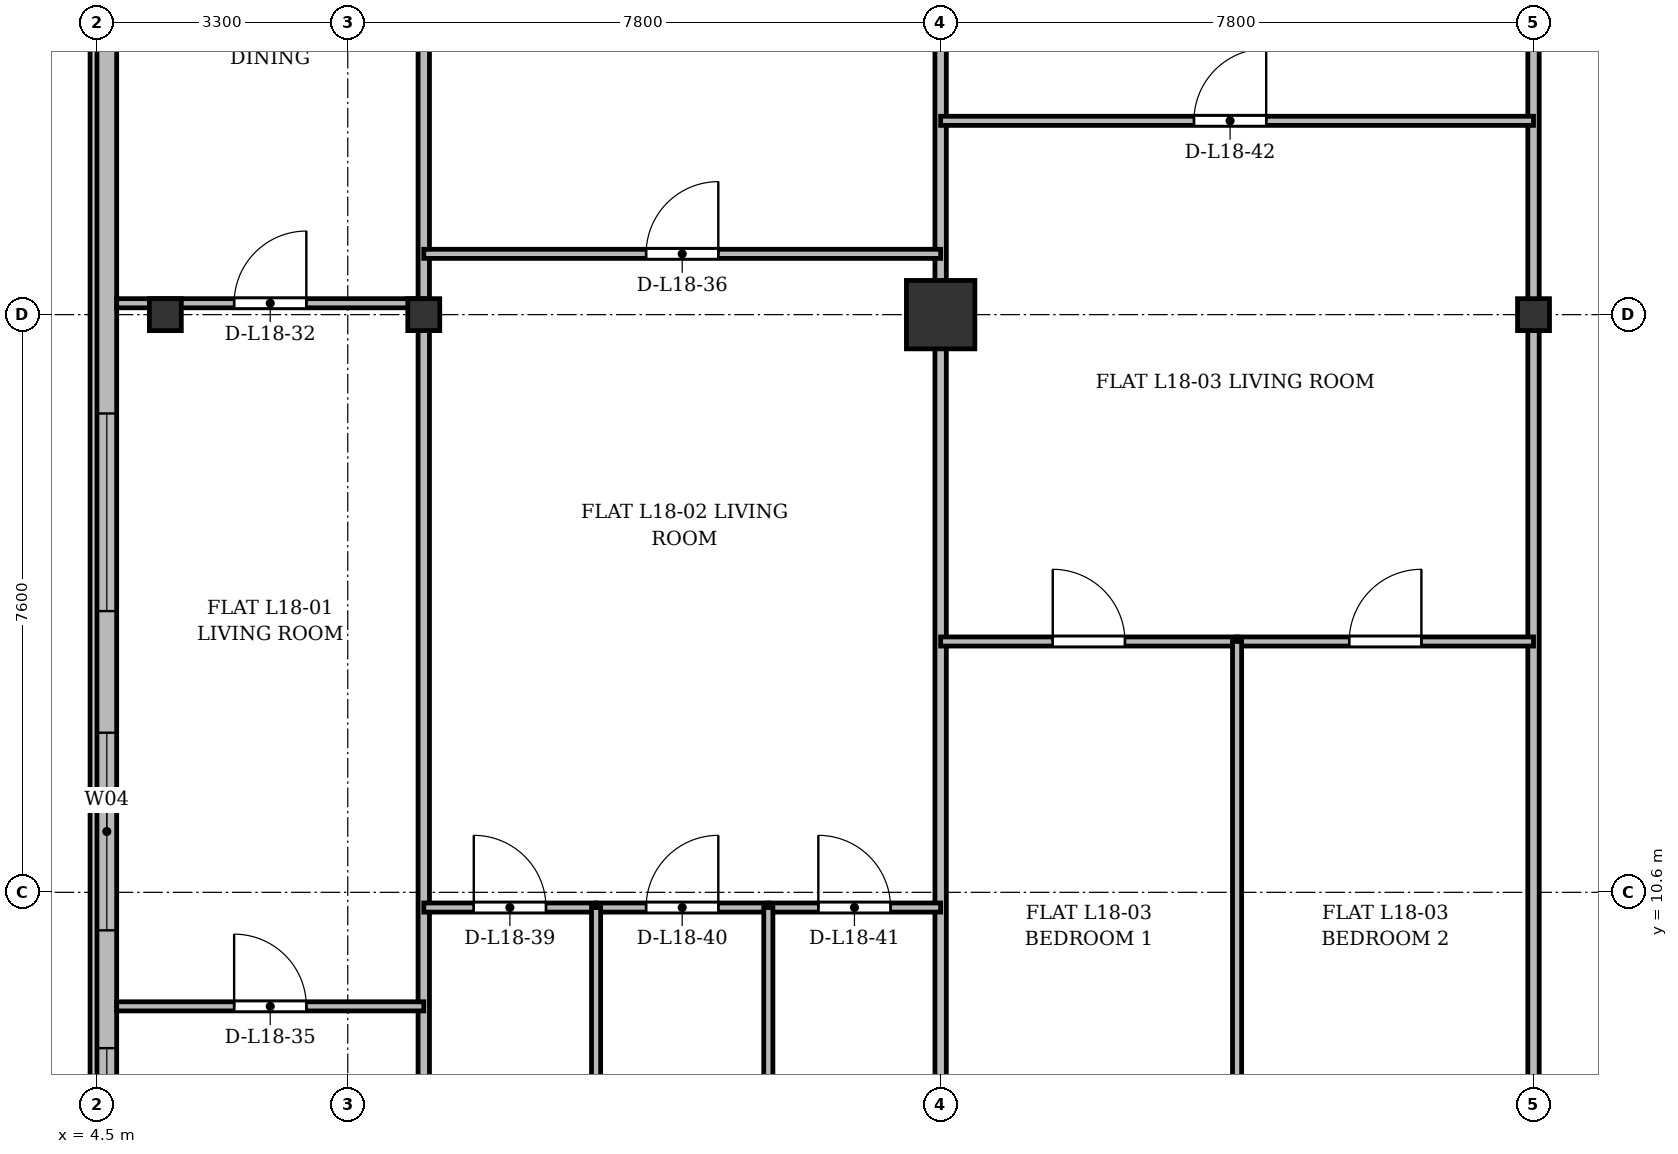
"""IFC4 building model, lengths in metres.
Left out: names, types, materials, properties, quantities, classifications, styles, units other than length and angle.
Written with IfcOpenShell. Run it as: python <this file> out.ifc"""

import sys

from ifc_helpers import new_model, si_unit, direction, frame, frame_2d, origin, origin_2d, place, context, subcontext, project, spatial, rectangle, i_section, extrude, source, transform, mapped, element, fill, save


model = new_model("IFC4")
c1 = context("Model", 3, precision=1e-05, world=origin(), true_north=direction((0.0, 1.0)))
c2 = subcontext(c1, "Body", "Model", "MODEL_VIEW")
j1 = project(units=[si_unit("LENGTHUNIT", "METRE"), si_unit("PLANEANGLEUNIT", "RADIAN")], contexts=[c1])
p1 = place(None, origin())
s1 = spatial("IfcSite", under=j1, at=p1, CompositionType="ELEMENT")
p2 = place(p1, origin())
s2 = spatial("IfcBuilding", under=s1, at=p2, CompositionType="ELEMENT")
p3 = place(p2, frame((0.0, 0.0, 70.3)))
s3 = spatial("IfcBuildingStorey", under=s2, at=p3, CompositionType="ELEMENT", Elevation=70.3)
m1 = source(origin(), c2, "Body", "SweptSolid", [
    extrude(i_section(OverallWidth=0.42, OverallDepth=0.42, WebThickness=0.026, FlangeThickness=0.04, at=origin_2d()), origin(), (0.0, 0.0, 1.0), 3.6),
])
for number, where, z_axis, x_axis in (
    (1, (5.4, 18.2, 0.0), (0.0, 0.0, 1.0), (1.0, 0.0, 0.0)),
    (2, (8.8, 18.2, 0.0), (0.0, 0.0, 1.0), (1.0, 0.0, 0.0)),
):
    element("IfcColumn", number, at=place(p3, frame(where, z_axis=z_axis, x_axis=x_axis)), inside=s3, PredefinedType="COLUMN", context=c2, shape_type="MappedRepresentation", body=[
        mapped(m1, transform((0.0, 0.0, 0.0), x_axis=(1.0, 0.0, 0.0), y_axis=(0.0, 1.0, 0.0), z_axis=(0.0, 0.0, 1.0), scale=1.0)),
    ])
m2 = source(origin(), c2, "Body", "SweptSolid", [
    extrude(rectangle(XDim=0.9, YDim=0.9, at=origin_2d()), origin(), (0.0, 0.0, 1.0), 3.6),
])
p4 = place(p3, frame((15.6, 18.2, 0.0), z_axis=(0.0, 0.0, 1.0), x_axis=(1.0, 0.0, 0.0)))
e3 = element("IfcColumn", 3, at=p4, inside=s3, PredefinedType="COLUMN", context=c2, shape_type="MappedRepresentation", body=[
    mapped(m2, transform((0.0, 0.0, 0.0), x_axis=(1.0, 0.0, 0.0), y_axis=(0.0, 1.0, 0.0), z_axis=(0.0, 0.0, 1.0), scale=1.0)),
])
p5 = place(p3, frame((23.4, 18.2, 0.0), z_axis=(0.0, 0.0, 1.0), x_axis=(1.0, 0.0, 0.0)))
e4 = element("IfcColumn", 4, at=p5, inside=s3, PredefinedType="COLUMN", context=c2, shape_type="MappedRepresentation", body=[
    mapped(m1, transform((0.0, 0.0, 0.0), x_axis=(1.0, 0.0, 0.0), y_axis=(0.0, 1.0, 0.0), z_axis=(0.0, 0.0, 1.0), scale=1.0)),
])
p6 = place(p3, frame((4.63, 5.9, 0.0), z_axis=(0.0, 0.0, 1.0), x_axis=(0.0, 1.0, 0.0)))
e5 = element("IfcWall", 5, at=p6, inside=s3, PredefinedType="SOLIDWALL", context=c2, shape_type="SweptSolid", body=[
    extrude(rectangle(XDim=39.6, YDim=0.26, at=frame_2d((19.8, 0.0))), origin(), (0.0, 0.0, 1.0), 3.22),
])
p7 = place(p6, frame((1.45, 0.0, 0.92)))
e6 = element("IfcOpeningElement", 6, at=p7, cuts=e5, PredefinedType="OPENING", context=c2, shape_type="SweptSolid", body=[
    extrude(rectangle(XDim=1.2, YDim=1.65, at=frame_2d((0.6, 0.825))), frame((0.0, 0.14, 0.0), z_axis=(0.0, -1.0, 0.0), x_axis=(1.0, 0.0, 0.0)), (0.0, 0.0, 1.0), 0.28),
])
p8 = place(p6, frame((4.2, 0.0, 0.92)))
e7 = element("IfcOpeningElement", 7, at=p8, cuts=e5, PredefinedType="OPENING", context=c2, shape_type="SweptSolid", body=[
    extrude(rectangle(XDim=2.6, YDim=1.9, at=frame_2d((1.3, 0.95))), frame((0.0, 0.14, 0.0), z_axis=(0.0, -1.0, 0.0), x_axis=(1.0, 0.0, 0.0)), (0.0, 0.0, 1.0), 0.28),
])
p9 = place(p6, frame((8.4, 0.0, 0.92)))
e8 = element("IfcOpeningElement", 8, at=p9, cuts=e5, PredefinedType="OPENING", context=c2, shape_type="SweptSolid", body=[
    extrude(rectangle(XDim=2.6, YDim=1.9, at=frame_2d((1.3, 0.95))), frame((0.0, 0.14, 0.0), z_axis=(0.0, -1.0, 0.0), x_axis=(1.0, 0.0, 0.0)), (0.0, 0.0, 1.0), 0.28),
])
p10 = place(p6, frame((33.9, 0.0, 0.92)))
e9 = element("IfcOpeningElement", 9, at=p10, cuts=e5, PredefinedType="OPENING", context=c2, shape_type="SweptSolid", body=[
    extrude(rectangle(XDim=1.2, YDim=1.65, at=frame_2d((0.6, 0.825))), frame((0.0, 0.14, 0.0), z_axis=(0.0, -1.0, 0.0), x_axis=(1.0, 0.0, 0.0)), (0.0, 0.0, 1.0), 0.28),
])
p11 = place(p6, frame((37.25, 0.0, 0.92)))
e10 = element("IfcOpeningElement", 10, at=p11, cuts=e5, PredefinedType="OPENING", context=c2, shape_type="SweptSolid", body=[
    extrude(rectangle(XDim=1.2, YDim=1.65, at=frame_2d((0.6, 0.825))), frame((0.0, 0.14, 0.0), z_axis=(0.0, -1.0, 0.0), x_axis=(1.0, 0.0, 0.0)), (0.0, 0.0, 1.0), 0.28),
])
for number, where, z_axis, x_axis in (
    (11, (8.8, 3.145, 0.0), (0.0, 0.0, 1.0), (0.0, 1.0, 0.0)),
    (12, (15.6, 3.145, 0.0), (0.0, 0.0, 1.0), (0.0, 1.0, 0.0)),
):
    element("IfcWall", number, at=place(p3, frame(where, z_axis=z_axis, x_axis=x_axis)), inside=s3, PredefinedType="PARTITIONING", context=c2, shape_type="SweptSolid", body=[
        extrude(rectangle(XDim=24.455, YDim=0.15, at=frame_2d((12.228, 0.0))), origin(), (0.0, 0.0, 1.0), 2.632),
    ])
p12 = place(p3, frame((23.4, 6.41, 0.0), z_axis=(0.0, 0.0, 1.0), x_axis=(0.0, 1.0, 0.0)))
e13 = element("IfcWall", 13, at=p12, inside=s3, PredefinedType="PARTITIONING", context=c2, shape_type="SweptSolid", body=[
    extrude(rectangle(XDim=21.19, YDim=0.15, at=frame_2d((10.595, 0.0))), origin(), (0.0, 0.0, 1.0), 2.632),
])
p13 = place(p3, frame((4.76, 18.35, 0.0), z_axis=(0.0, 0.0, 1.0), x_axis=(1.0, 0.0, 0.0)))
e14 = element("IfcWall", 14, at=p13, inside=s3, PredefinedType="PARTITIONING", context=c2, shape_type="SweptSolid", body=[
    extrude(rectangle(XDim=4.04, YDim=0.12, at=frame_2d((2.02, 0.0))), origin(), (0.0, 0.0, 1.0), 2.57),
])
p14 = place(p13, frame((1.545, 0.0, 0.0)))
e15 = element("IfcOpeningElement", 15, at=p14, cuts=e14, PredefinedType="OPENING", context=c2, shape_type="SweptSolid", body=[
    extrude(rectangle(XDim=0.95, YDim=2.15, at=frame_2d((0.475, 1.075))), frame((0.0, 0.07, 0.0), z_axis=(0.0, -1.0, 0.0), x_axis=(1.0, 0.0, 0.0)), (0.0, 0.0, 1.0), 0.14),
])
p15 = place(p3, frame((4.76, 9.1, 0.0), z_axis=(0.0, 0.0, 1.0), x_axis=(1.0, 0.0, 0.0)))
e16 = element("IfcWall", 16, at=p15, inside=s3, PredefinedType="PARTITIONING", context=c2, shape_type="SweptSolid", body=[
    extrude(rectangle(XDim=4.04, YDim=0.12, at=frame_2d((2.02, 0.0))), origin(), (0.0, 0.0, 1.0), 2.632),
])
p16 = place(p15, frame((1.545, 0.0, 0.0)))
e17 = element("IfcOpeningElement", 17, at=p16, cuts=e16, PredefinedType="OPENING", context=c2, shape_type="SweptSolid", body=[
    extrude(rectangle(XDim=0.95, YDim=2.15, at=frame_2d((0.475, 1.075))), frame((0.0, 0.07, 0.0), z_axis=(0.0, -1.0, 0.0), x_axis=(1.0, 0.0, 0.0)), (0.0, 0.0, 1.0), 0.14),
])
p17 = place(p3, frame((8.8, 19.0, 0.0), z_axis=(0.0, 0.0, 1.0), x_axis=(1.0, 0.0, 0.0)))
e18 = element("IfcWall", 18, at=p17, inside=s3, PredefinedType="PARTITIONING", context=c2, shape_type="SweptSolid", body=[
    extrude(rectangle(XDim=6.8, YDim=0.12, at=frame_2d((3.4, 0.0))), origin(), (0.0, 0.0, 1.0), 2.632),
])
p18 = place(p17, frame((2.925, 0.0, 0.0)))
e19 = element("IfcOpeningElement", 19, at=p18, cuts=e18, PredefinedType="OPENING", context=c2, shape_type="SweptSolid", body=[
    extrude(rectangle(XDim=0.95, YDim=2.15, at=frame_2d((0.475, 1.075))), frame((0.0, 0.07, 0.0), z_axis=(0.0, -1.0, 0.0), x_axis=(1.0, 0.0, 0.0)), (0.0, 0.0, 1.0), 0.14),
])
p19 = place(p3, frame((8.8, 10.4, 0.0), z_axis=(0.0, 0.0, 1.0), x_axis=(1.0, 0.0, 0.0)))
e20 = element("IfcWall", 20, at=p19, inside=s3, PredefinedType="PARTITIONING", context=c2, shape_type="SweptSolid", body=[
    extrude(rectangle(XDim=2.267, YDim=0.12, at=frame_2d((1.133, 0.0))), origin(), (0.0, 0.0, 1.0), 2.632),
])
p20 = place(p19, frame((0.658, 0.0, 0.0)))
e21 = element("IfcOpeningElement", 21, at=p20, cuts=e20, PredefinedType="OPENING", context=c2, shape_type="SweptSolid", body=[
    extrude(rectangle(XDim=0.95, YDim=2.15, at=frame_2d((0.475, 1.075))), frame((0.0, 0.07, 0.0), z_axis=(0.0, -1.0, 0.0), x_axis=(1.0, 0.0, 0.0)), (0.0, 0.0, 1.0), 0.14),
])
p21 = place(p3, frame((11.067, 10.4, 0.0), z_axis=(0.0, 0.0, 1.0), x_axis=(1.0, 0.0, 0.0)))
e22 = element("IfcWall", 22, at=p21, inside=s3, PredefinedType="PARTITIONING", context=c2, shape_type="SweptSolid", body=[
    extrude(rectangle(XDim=2.266, YDim=0.12, at=frame_2d((1.133, 0.0))), origin(), (0.0, 0.0, 1.0), 3.22),
])
p22 = place(p21, frame((0.658, 0.0, 0.0)))
e23 = element("IfcOpeningElement", 23, at=p22, cuts=e22, PredefinedType="OPENING", context=c2, shape_type="SweptSolid", body=[
    extrude(rectangle(XDim=0.95, YDim=2.15, at=frame_2d((0.475, 1.075))), frame((0.0, 0.07, 0.0), z_axis=(0.0, -1.0, 0.0), x_axis=(1.0, 0.0, 0.0)), (0.0, 0.0, 1.0), 0.14),
])
p23 = place(p3, frame((11.067, 3.145, 0.0), z_axis=(0.0, 0.0, 1.0), x_axis=(0.0, 1.0, 0.0)))
e24 = element("IfcWall", 24, at=p23, inside=s3, PredefinedType="PARTITIONING", context=c2, shape_type="SweptSolid", body=[
    extrude(rectangle(XDim=7.255, YDim=0.12, at=frame_2d((3.627, 0.0))), origin(), (0.0, 0.0, 1.0), 2.57),
])
p24 = place(p3, frame((13.333, 10.4, 0.0), z_axis=(0.0, 0.0, 1.0), x_axis=(1.0, 0.0, 0.0)))
e25 = element("IfcWall", 25, at=p24, inside=s3, PredefinedType="PARTITIONING", context=c2, shape_type="SweptSolid", body=[
    extrude(rectangle(XDim=2.267, YDim=0.12, at=frame_2d((1.134, 0.0))), origin(), (0.0, 0.0, 1.0), 2.632),
])
p25 = place(p24, frame((0.658, 0.0, 0.0)))
e26 = element("IfcOpeningElement", 26, at=p25, cuts=e25, PredefinedType="OPENING", context=c2, shape_type="SweptSolid", body=[
    extrude(rectangle(XDim=0.95, YDim=2.15, at=frame_2d((0.475, 1.075))), frame((0.0, 0.07, 0.0), z_axis=(0.0, -1.0, 0.0), x_axis=(1.0, 0.0, 0.0)), (0.0, 0.0, 1.0), 0.14),
])
p26 = place(p3, frame((13.333, 3.145, 0.0), z_axis=(0.0, 0.0, 1.0), x_axis=(0.0, 1.0, 0.0)))
e27 = element("IfcWall", 27, at=p26, inside=s3, PredefinedType="PARTITIONING", context=c2, shape_type="SweptSolid", body=[
    extrude(rectangle(XDim=7.255, YDim=0.12, at=frame_2d((3.627, 0.0))), origin(), (0.0, 0.0, 1.0), 2.57),
])
p27 = place(p3, frame((15.6, 20.75, 0.0), z_axis=(0.0, 0.0, 1.0), x_axis=(1.0, 0.0, 0.0)))
e28 = element("IfcWall", 28, at=p27, inside=s3, PredefinedType="PARTITIONING", context=c2, shape_type="SweptSolid", body=[
    extrude(rectangle(XDim=7.8, YDim=0.12, at=frame_2d((3.9, 0.0))), origin(), (0.0, 0.0, 1.0), 2.632),
])
p28 = place(p27, frame((3.333, 0.0, 0.0)))
e29 = element("IfcOpeningElement", 29, at=p28, cuts=e28, PredefinedType="OPENING", context=c2, shape_type="SweptSolid", body=[
    extrude(rectangle(XDim=0.95, YDim=2.15, at=frame_2d((0.475, 1.075))), frame((0.0, 0.07, 0.0), z_axis=(0.0, -1.0, 0.0), x_axis=(1.0, 0.0, 0.0)), (0.0, 0.0, 1.0), 0.14),
])
p29 = place(p3, frame((15.6, 13.9, 0.0), z_axis=(0.0, 0.0, 1.0), x_axis=(1.0, 0.0, 0.0)))
e30 = element("IfcWall", 30, at=p29, inside=s3, PredefinedType="PARTITIONING", context=c2, shape_type="SweptSolid", body=[
    extrude(rectangle(XDim=3.9, YDim=0.12, at=frame_2d((1.95, 0.0))), origin(), (0.0, 0.0, 1.0), 2.632),
])
p30 = place(p29, frame((1.475, 0.0, 0.0)))
e31 = element("IfcOpeningElement", 31, at=p30, cuts=e30, PredefinedType="OPENING", context=c2, shape_type="SweptSolid", body=[
    extrude(rectangle(XDim=0.95, YDim=2.15, at=frame_2d((0.475, 1.075))), frame((0.0, 0.07, 0.0), z_axis=(0.0, -1.0, 0.0), x_axis=(1.0, 0.0, 0.0)), (0.0, 0.0, 1.0), 0.14),
])
p31 = place(p3, frame((19.5, 13.9, 0.0), z_axis=(0.0, 0.0, 1.0), x_axis=(1.0, 0.0, 0.0)))
e32 = element("IfcWall", 32, at=p31, inside=s3, PredefinedType="PARTITIONING", context=c2, shape_type="SweptSolid", body=[
    extrude(rectangle(XDim=3.9, YDim=0.12, at=frame_2d((1.95, 0.0))), origin(), (0.0, 0.0, 1.0), 2.632),
])
p32 = place(p31, frame((1.475, 0.0, 0.0)))
e33 = element("IfcOpeningElement", 33, at=p32, cuts=e32, PredefinedType="OPENING", context=c2, shape_type="SweptSolid", body=[
    extrude(rectangle(XDim=0.95, YDim=2.15, at=frame_2d((0.475, 1.075))), frame((0.0, 0.07, 0.0), z_axis=(0.0, -1.0, 0.0), x_axis=(1.0, 0.0, 0.0)), (0.0, 0.0, 1.0), 0.14),
])
p33 = place(p3, frame((19.5, 6.41, 0.0), z_axis=(0.0, 0.0, 1.0), x_axis=(0.0, 1.0, 0.0)))
e34 = element("IfcWall", 34, at=p33, inside=s3, PredefinedType="PARTITIONING", context=c2, shape_type="SweptSolid", body=[
    extrude(rectangle(XDim=7.49, YDim=0.12, at=frame_2d((3.745, 0.0))), origin(), (0.0, 0.0, 1.0), 3.22),
])
m3 = source(origin(), c2, "Body", "SweptSolid", [
    extrude(rectangle(XDim=1.2, YDim=1.65, at=frame_2d((0.6, 0.825))), frame((0.0, 0.03, 0.0), z_axis=(0.0, -1.0, 0.0), x_axis=(1.0, 0.0, 0.0)), (0.0, 0.0, 1.0), 0.06),
])
p34 = place(p7, origin())
e35 = element("IfcWindow", 35, at=p34, inside=s3, PartitioningType="SINGLE_PANEL", PredefinedType="WINDOW", context=c2, shape_type="MappedRepresentation", body=[
    mapped(m3, transform((0.0, 0.0, 0.0), x_axis=(1.0, 0.0, 0.0), y_axis=(0.0, 1.0, 0.0), z_axis=(0.0, 0.0, 1.0), scale=1.0)),
])
fill(e6, e35)
m4 = source(origin(), c2, "Body", "SweptSolid", [
    extrude(rectangle(XDim=2.6, YDim=1.9, at=frame_2d((1.3, 0.95))), frame((0.0, 0.03, 0.0), z_axis=(0.0, -1.0, 0.0), x_axis=(1.0, 0.0, 0.0)), (0.0, 0.0, 1.0), 0.06),
])
p35 = place(p8, origin())
e36 = element("IfcWindow", 36, at=p35, inside=s3, PartitioningType="SINGLE_PANEL", PredefinedType="WINDOW", context=c2, shape_type="MappedRepresentation", body=[
    mapped(m4, transform((0.0, 0.0, 0.0), x_axis=(1.0, 0.0, 0.0), y_axis=(0.0, 1.0, 0.0), z_axis=(0.0, 0.0, 1.0), scale=1.0)),
])
fill(e7, e36)
p36 = place(p9, origin())
e37 = element("IfcWindow", 37, at=p36, inside=s3, PartitioningType="SINGLE_PANEL", PredefinedType="WINDOW", context=c2, shape_type="MappedRepresentation", body=[
    mapped(m4, transform((0.0, 0.0, 0.0), x_axis=(1.0, 0.0, 0.0), y_axis=(0.0, 1.0, 0.0), z_axis=(0.0, 0.0, 1.0), scale=1.0)),
])
fill(e8, e37)
m5 = source(origin(), c2, "Body", "SweptSolid", [
    extrude(rectangle(XDim=0.95, YDim=2.15, at=frame_2d((0.475, 1.075))), frame((0.0, 0.025, 0.0), z_axis=(0.0, -1.0, 0.0), x_axis=(1.0, 0.0, 0.0)), (0.0, 0.0, 1.0), 0.05),
])
p37 = place(p14, origin())
e38 = element("IfcDoor", 38, at=p37, inside=s3, OperationType="SINGLE_SWING_RIGHT", PredefinedType="DOOR", context=c2, shape_type="MappedRepresentation", body=[
    mapped(m5, transform((0.0, 0.0, 0.0), x_axis=(1.0, 0.0, 0.0), y_axis=(0.0, 1.0, 0.0), z_axis=(0.0, 0.0, 1.0), scale=1.0)),
])
fill(e15, e38)
p38 = place(p16, origin())
e39 = element("IfcDoor", 39, at=p38, inside=s3, OperationType="SINGLE_SWING_LEFT", PredefinedType="DOOR", context=c2, shape_type="MappedRepresentation", body=[
    mapped(m5, transform((0.0, 0.0, 0.0), x_axis=(1.0, 0.0, 0.0), y_axis=(0.0, 1.0, 0.0), z_axis=(0.0, 0.0, 1.0), scale=1.0)),
])
fill(e17, e39)
p39 = place(p18, origin())
e40 = element("IfcDoor", 40, at=p39, inside=s3, OperationType="SINGLE_SWING_RIGHT", PredefinedType="DOOR", context=c2, shape_type="MappedRepresentation", body=[
    mapped(m5, transform((0.0, 0.0, 0.0), x_axis=(1.0, 0.0, 0.0), y_axis=(0.0, 1.0, 0.0), z_axis=(0.0, 0.0, 1.0), scale=1.0)),
])
fill(e19, e40)
p40 = place(p20, origin())
e41 = element("IfcDoor", 41, at=p40, inside=s3, OperationType="SINGLE_SWING_LEFT", PredefinedType="DOOR", context=c2, shape_type="MappedRepresentation", body=[
    mapped(m5, transform((0.0, 0.0, 0.0), x_axis=(1.0, 0.0, 0.0), y_axis=(0.0, 1.0, 0.0), z_axis=(0.0, 0.0, 1.0), scale=1.0)),
])
fill(e21, e41)
p41 = place(p22, origin())
e42 = element("IfcDoor", 42, at=p41, inside=s3, OperationType="SINGLE_SWING_RIGHT", PredefinedType="DOOR", context=c2, shape_type="MappedRepresentation", body=[
    mapped(m5, transform((0.0, 0.0, 0.0), x_axis=(1.0, 0.0, 0.0), y_axis=(0.0, 1.0, 0.0), z_axis=(0.0, 0.0, 1.0), scale=1.0)),
])
fill(e23, e42)
p42 = place(p25, origin())
e43 = element("IfcDoor", 43, at=p42, inside=s3, OperationType="SINGLE_SWING_LEFT", PredefinedType="DOOR", context=c2, shape_type="MappedRepresentation", body=[
    mapped(m5, transform((0.0, 0.0, 0.0), x_axis=(1.0, 0.0, 0.0), y_axis=(0.0, 1.0, 0.0), z_axis=(0.0, 0.0, 1.0), scale=1.0)),
])
fill(e26, e43)
p43 = place(p28, origin())
e44 = element("IfcDoor", 44, at=p43, inside=s3, OperationType="SINGLE_SWING_RIGHT", PredefinedType="DOOR", context=c2, shape_type="MappedRepresentation", body=[
    mapped(m5, transform((0.0, 0.0, 0.0), x_axis=(1.0, 0.0, 0.0), y_axis=(0.0, 1.0, 0.0), z_axis=(0.0, 0.0, 1.0), scale=1.0)),
])
fill(e29, e44)
p44 = place(p30, origin())
e45 = element("IfcDoor", 45, at=p44, inside=s3, OperationType="SINGLE_SWING_LEFT", PredefinedType="DOOR", context=c2, shape_type="MappedRepresentation", body=[
    mapped(m5, transform((0.0, 0.0, 0.0), x_axis=(1.0, 0.0, 0.0), y_axis=(0.0, 1.0, 0.0), z_axis=(0.0, 0.0, 1.0), scale=1.0)),
])
fill(e31, e45)
p45 = place(p32, origin())
e46 = element("IfcDoor", 46, at=p45, inside=s3, OperationType="SINGLE_SWING_RIGHT", PredefinedType="DOOR", context=c2, shape_type="MappedRepresentation", body=[
    mapped(m5, transform((0.0, 0.0, 0.0), x_axis=(1.0, 0.0, 0.0), y_axis=(0.0, 1.0, 0.0), z_axis=(0.0, 0.0, 1.0), scale=1.0)),
])
fill(e33, e46)
save(model, sys.argv[1])
